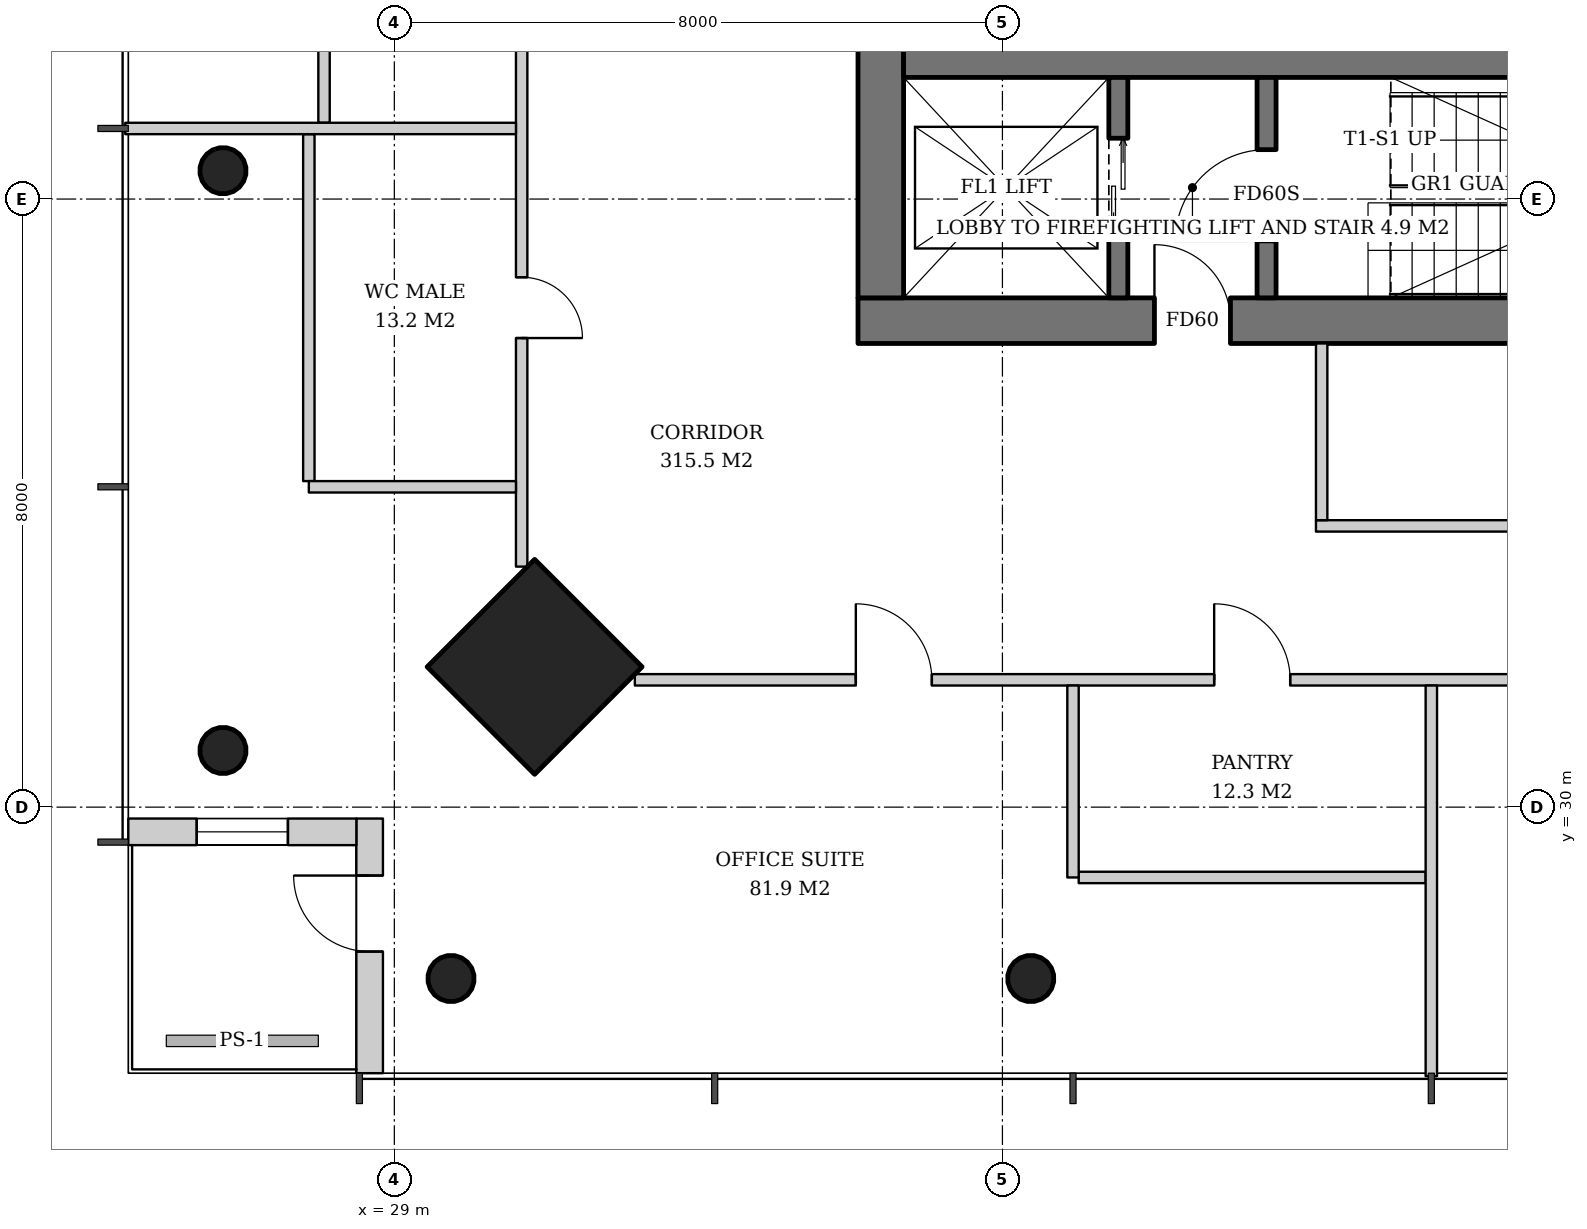
"""IFC4 building model, lengths in metres.
Left out: names, types, materials, properties, quantities, classifications, styles, units other than length and angle.
Written with IfcOpenShell. Run it as: python <this file> out.ifc"""

import sys

from ifc_helpers import new_model, si_unit, direction, frame, frame_2d, origin, origin_2d, place, context, subcontext, project, spatial, rectangle, hollow_circle, extrude, element, fill, save


model = new_model("IFC4")
c1 = context("Model", 3, precision=1e-05, world=origin(), true_north=direction((0.0, 1.0)))
c2 = subcontext(c1, "Body", "Model", "MODEL_VIEW")
j1 = project(units=[si_unit("LENGTHUNIT", "METRE"), si_unit("PLANEANGLEUNIT", "RADIAN")], contexts=[c1])
p1 = place(None, origin())
s1 = spatial("IfcSite", under=j1, at=p1, CompositionType="ELEMENT")
p2 = place(p1, origin())
s2 = spatial("IfcBuilding", under=s1, at=p2, CompositionType="ELEMENT")
p3 = place(p2, frame((0.0, 0.0, 199.6)))
s3 = spatial("IfcBuildingStorey", under=s2, at=p3, CompositionType="ELEMENT", Elevation=199.6)
p4 = place(p3, frame((30.807, 31.807, 0.0), z_axis=(0.031900153262, 0.031900153262, 0.998981861919), x_axis=(-0.707106781187, 0.707106781187, 0.0)))
e1 = element("IfcColumn", 1, at=p4, inside=s3, PredefinedType="COLUMN", context=c2, shape_type="SweptSolid", body=[
    extrude(rectangle(XDim=2.0, YDim=2.0, at=origin_2d()), origin(), (0.0, 0.0, 1.0), 3.804),
])
p5 = place(p3, frame((26.707, 30.707, 0.0), z_axis=(0.031964207655, 0.031964207655, 0.998977766949), x_axis=(-0.707106781187, 0.707106781187, 0.0)))
e2 = element("IfcColumn", 2, at=p5, inside=s3, PredefinedType="COLUMN", context=c2, shape_type="SweptSolid", body=[
    extrude(hollow_circle(Radius=0.305, WallThickness=0.025, at=origin_2d()), origin(), (0.0, 0.0, 1.0), 3.804),
])
p6 = place(p3, frame((26.707, 38.354, 0.0), z_axis=(0.031976461511, 0.015988230756, 0.999360736865), x_axis=(-0.4472135955, 0.894427191, 0.0)))
e3 = element("IfcColumn", 3, at=p6, inside=s3, PredefinedType="COLUMN", context=c2, shape_type="SweptSolid", body=[
    extrude(hollow_circle(Radius=0.305, WallThickness=0.025, at=origin_2d()), origin(), (0.0, 0.0, 1.0), 3.802),
])
p7 = place(p3, frame((29.707, 27.707, 0.0), z_axis=(0.031964207655, 0.031964207655, 0.998977766949), x_axis=(-0.707106781187, 0.707106781187, 0.0)))
e4 = element("IfcColumn", 4, at=p7, inside=s3, PredefinedType="COLUMN", context=c2, shape_type="SweptSolid", body=[
    extrude(hollow_circle(Radius=0.305, WallThickness=0.025, at=origin_2d()), origin(), (0.0, 0.0, 1.0), 3.804),
])
p8 = place(p3, frame((37.354, 27.707, 0.0), z_axis=(0.015988230756, 0.031976461511, 0.999360736865), x_axis=(-0.894427191, 0.4472135955, 0.0)))
e5 = element("IfcColumn", 5, at=p8, inside=s3, PredefinedType="COLUMN", context=c2, shape_type="SweptSolid", body=[
    extrude(hollow_circle(Radius=0.305, WallThickness=0.025, at=origin_2d()), origin(), (0.0, 0.0, 1.0), 3.802),
])
p9 = place(p3, frame((35.1, 36.4, 0.0), z_axis=(0.0, 0.0, 1.0), x_axis=(1.0, 0.0, 0.0)))
e6 = element("IfcWall", 6, at=p9, inside=s3, PredefinedType="SHEAR", context=c2, shape_type="SweptSolid", body=[
    extrude(rectangle(XDim=19.8, YDim=0.6, at=frame_2d((9.9, 0.0))), origin(), (0.0, 0.0, 1.0), 3.8),
])
p10 = place(p9, frame((3.9, 0.0, 0.0)))
e7 = element("IfcOpeningElement", 7, at=p10, cuts=e6, PredefinedType="OPENING", context=c2, shape_type="SweptSolid", body=[
    extrude(rectangle(XDim=1.0, YDim=2.1, at=frame_2d((0.5, 1.05))), frame((0.0, 0.31, 0.0), z_axis=(0.0, -1.0, 0.0), x_axis=(1.0, 0.0, 0.0)), (0.0, 0.0, 1.0), 0.62),
])
p11 = place(p9, frame((15.35, 0.0, 0.0)))
e8 = element("IfcOpeningElement", 8, at=p11, cuts=e6, PredefinedType="OPENING", context=c2, shape_type="SweptSolid", body=[
    extrude(rectangle(XDim=1.0, YDim=2.1, at=frame_2d((0.5, 1.05))), frame((0.0, 0.31, 0.0), z_axis=(0.0, -1.0, 0.0), x_axis=(1.0, 0.0, 0.0)), (0.0, 0.0, 1.0), 0.62),
])
p12 = place(p3, frame((35.4, 36.7, 0.0), z_axis=(0.0, 0.0, 1.0), x_axis=(0.0, 1.0, 0.0)))
e9 = element("IfcWall", 9, at=p12, inside=s3, PredefinedType="SHEAR", context=c2, shape_type="SweptSolid", body=[
    extrude(rectangle(XDim=18.6, YDim=0.6, at=frame_2d((9.3, 0.0))), origin(), (0.0, 0.0, 1.0), 3.8),
])
p13 = place(p12, frame((8.4, 0.0, 0.0)))
e10 = element("IfcOpeningElement", 10, at=p13, cuts=e9, PredefinedType="OPENING", context=c2, shape_type="SweptSolid", body=[
    extrude(rectangle(XDim=1.8, YDim=2.4, at=frame_2d((0.9, 1.2))), frame((0.0, 0.31, 0.0), z_axis=(0.0, -1.0, 0.0), x_axis=(1.0, 0.0, 0.0)), (0.0, 0.0, 1.0), 0.62),
])
p14 = place(p3, frame((35.7, 39.8, 0.0), z_axis=(0.0, 0.0, 1.0), x_axis=(1.0, 0.0, 0.0)))
e11 = element("IfcWall", 11, at=p14, inside=s3, PredefinedType="SHEAR", context=c2, shape_type="SweptSolid", body=[
    extrude(rectangle(XDim=18.6, YDim=0.4, at=frame_2d((9.3, 0.0))), origin(), (0.0, 0.0, 1.0), 3.8),
])
p15 = place(p3, frame((28.675, 26.5, 0.0), z_axis=(0.0, 0.0, 1.0), x_axis=(0.0, 1.0, 0.0)))
e12 = element("IfcWall", 12, at=p15, inside=s3, PredefinedType="SOLIDWALL", context=c2, shape_type="SweptSolid", body=[
    extrude(rectangle(XDim=3.35, YDim=0.35, at=frame_2d((1.675, 0.0))), origin(), (0.0, 0.0, 1.0), 3.62),
])
p16 = place(p15, frame((1.6, 0.0, 0.0)))
e13 = element("IfcOpeningElement", 13, at=p16, cuts=e12, PredefinedType="OPENING", context=c2, shape_type="SweptSolid", body=[
    extrude(rectangle(XDim=1.0, YDim=2.4, at=frame_2d((0.5, 1.2))), frame((0.0, 0.185, 0.0), z_axis=(0.0, -1.0, 0.0), x_axis=(1.0, 0.0, 0.0)), (0.0, 0.0, 1.0), 0.37),
])
p17 = place(p3, frame((28.5, 29.675, 0.0), z_axis=(0.0, 0.0, 1.0), x_axis=(-1.0, 0.0, 0.0)))
e14 = element("IfcWall", 14, at=p17, inside=s3, PredefinedType="SOLIDWALL", context=c2, shape_type="SweptSolid", body=[
    extrude(rectangle(XDim=3.0, YDim=0.35, at=frame_2d((1.5, 0.0))), origin(), (0.0, 0.0, 1.0), 3.62),
])
p18 = place(p17, frame((0.9, 0.0, 0.6)))
e15 = element("IfcOpeningElement", 15, at=p18, cuts=e14, PredefinedType="OPENING", context=c2, shape_type="SweptSolid", body=[
    extrude(rectangle(XDim=1.2, YDim=2.55, at=frame_2d((0.6, 1.275))), frame((0.0, 0.185, 0.0), z_axis=(0.0, -1.0, 0.0), x_axis=(1.0, 0.0, 0.0)), (0.0, 0.0, 1.0), 0.37),
])
p19 = place(p3, frame((38.525, 36.7, 0.0), z_axis=(0.0, 0.0, 1.0), x_axis=(0.0, 1.0, 0.0)))
e16 = element("IfcWall", 16, at=p19, inside=s3, PredefinedType="SHEAR", context=c2, shape_type="SweptSolid", body=[
    extrude(rectangle(XDim=2.9, YDim=0.25, at=frame_2d((1.45, 0.0))), origin(), (0.0, 0.0, 1.0), 3.8),
])
p20 = place(p19, frame((0.8, 0.0, 0.0)))
e17 = element("IfcOpeningElement", 17, at=p20, cuts=e16, PredefinedType="OPENING", context=c2, shape_type="SweptSolid", body=[
    extrude(rectangle(XDim=1.3, YDim=2.2, at=frame_2d((0.65, 1.1))), frame((0.0, 0.135, 0.0), z_axis=(0.0, -1.0, 0.0), x_axis=(1.0, 0.0, 0.0)), (0.0, 0.0, 1.0), 0.27),
])
p21 = place(p3, frame((40.475, 36.7, 0.0), z_axis=(0.0, 0.0, 1.0), x_axis=(0.0, 1.0, 0.0)))
e18 = element("IfcWall", 18, at=p21, inside=s3, PredefinedType="SHEAR", context=c2, shape_type="SweptSolid", body=[
    extrude(rectangle(XDim=2.9, YDim=0.25, at=frame_2d((1.45, 0.0))), origin(), (0.0, 0.0, 1.0), 3.8),
])
p22 = place(p21, frame((0.75, 0.0, 0.0)))
e19 = element("IfcOpeningElement", 19, at=p22, cuts=e18, PredefinedType="OPENING", context=c2, shape_type="SweptSolid", body=[
    extrude(rectangle(XDim=1.2, YDim=2.1, at=frame_2d((0.6, 1.05))), frame((0.0, 0.135, 0.0), z_axis=(0.0, -1.0, 0.0), x_axis=(1.0, 0.0, 0.0)), (0.0, 0.0, 1.0), 0.27),
])
p23 = place(p3, frame((41.125, 33.7, 0.0), z_axis=(0.0, 0.0, 1.0), x_axis=(1.0, 0.0, 0.0)))
e20 = element("IfcWall", 20, at=p23, inside=s3, PredefinedType="PARTITIONING", context=c2, shape_type="SweptSolid", body=[
    extrude(rectangle(XDim=8.2, YDim=0.15, at=frame_2d((4.1, 0.0))), origin(), (0.0, 0.0, 1.0), 2.867),
])
p24 = place(p23, frame((3.6, 0.0, 0.0)))
e21 = element("IfcOpeningElement", 21, at=p24, cuts=e20, PredefinedType="OPENING", context=c2, shape_type="SweptSolid", body=[
    extrude(rectangle(XDim=1.0, YDim=2.1, at=frame_2d((0.5, 1.05))), frame((0.0, 0.085, 0.0), z_axis=(0.0, -1.0, 0.0), x_axis=(1.0, 0.0, 0.0)), (0.0, 0.0, 1.0), 0.17),
])
p25 = place(p3, frame((41.2, 36.1, 0.0), z_axis=(0.0, 0.0, 1.0), x_axis=(0.0, -1.0, 0.0)))
e22 = element("IfcWall", 22, at=p25, inside=s3, PredefinedType="PARTITIONING", context=c2, shape_type="SweptSolid", body=[
    extrude(rectangle(XDim=2.325, YDim=0.15, at=frame_2d((1.163, 0.0))), origin(), (0.0, 0.0, 1.0), 3.62),
])
for number, where, z_axis, x_axis in (
    (23, (28.075, 43.568, 0.0), (0.0, 0.0, 1.0), (0.0, -1.0, 0.0)),
    (24, (27.875, 38.854, 0.0), (0.0, 0.0, 1.0), (0.0, -1.0, 0.0)),
):
    element("IfcWall", number, at=place(p3, frame(where, z_axis=z_axis, x_axis=x_axis)), inside=s3, PredefinedType="PARTITIONING", context=c2, shape_type="SweptSolid", body=[
        extrude(rectangle(XDim=4.564, YDim=0.15, at=frame_2d((2.282, 0.0))), origin(), (0.0, 0.0, 1.0), 2.867),
    ])
p26 = place(p3, frame((30.675, 58.836, 0.0), z_axis=(0.0, 0.0, 1.0), x_axis=(0.0, -1.0, 0.0)))
e25 = element("IfcWall", 25, at=p26, inside=s3, PredefinedType="PARTITIONING", context=c2, shape_type="SweptSolid", body=[
    extrude(rectangle(XDim=25.671, YDim=0.15, at=frame_2d((12.836, 0.0))), origin(), (0.0, 0.0, 1.0), 2.867),
])
p27 = place(p26, frame((2.907, 0.0, 0.0)))
e26 = element("IfcOpeningElement", 26, at=p27, cuts=e25, PredefinedType="OPENING", context=c2, shape_type="SweptSolid", body=[
    extrude(rectangle(XDim=1.0, YDim=2.1, at=frame_2d((0.5, 1.05))), frame((0.0, 0.085, 0.0), z_axis=(0.0, -1.0, 0.0), x_axis=(1.0, 0.0, 0.0)), (0.0, 0.0, 1.0), 0.17),
])
p28 = place(p26, frame((7.622, 0.0, 0.0)))
e27 = element("IfcOpeningElement", 27, at=p28, cuts=e25, PredefinedType="OPENING", context=c2, shape_type="SweptSolid", body=[
    extrude(rectangle(XDim=1.0, YDim=2.1, at=frame_2d((0.5, 1.05))), frame((0.0, 0.085, 0.0), z_axis=(0.0, -1.0, 0.0), x_axis=(1.0, 0.0, 0.0)), (0.0, 0.0, 1.0), 0.17),
])
p29 = place(p26, frame((12.436, 0.0, 0.0)))
e28 = element("IfcOpeningElement", 28, at=p29, cuts=e25, PredefinedType="OPENING", context=c2, shape_type="SweptSolid", body=[
    extrude(rectangle(XDim=0.8, YDim=2.1, at=frame_2d((0.4, 1.05))), frame((0.0, 0.085, 0.0), z_axis=(0.0, -1.0, 0.0), x_axis=(1.0, 0.0, 0.0)), (0.0, 0.0, 1.0), 0.17),
])
p30 = place(p26, frame((17.05, 0.0, 0.0)))
e29 = element("IfcOpeningElement", 29, at=p30, cuts=e25, PredefinedType="OPENING", context=c2, shape_type="SweptSolid", body=[
    extrude(rectangle(XDim=1.0, YDim=2.1, at=frame_2d((0.5, 1.05))), frame((0.0, 0.085, 0.0), z_axis=(0.0, -1.0, 0.0), x_axis=(1.0, 0.0, 0.0)), (0.0, 0.0, 1.0), 0.17),
])
p31 = place(p26, frame((21.864, 0.0, 0.0)))
e30 = element("IfcOpeningElement", 30, at=p31, cuts=e25, PredefinedType="OPENING", context=c2, shape_type="SweptSolid", body=[
    extrude(rectangle(XDim=0.8, YDim=2.1, at=frame_2d((0.4, 1.05))), frame((0.0, 0.085, 0.0), z_axis=(0.0, -1.0, 0.0), x_axis=(1.0, 0.0, 0.0)), (0.0, 0.0, 1.0), 0.17),
])
p32 = place(p3, frame((30.6, 38.928, 0.0), z_axis=(0.0, 0.0, 1.0), x_axis=(-1.0, 0.0, 0.0)))
e31 = element("IfcWall", 31, at=p32, inside=s3, PredefinedType="PARTITIONING", context=c2, shape_type="SweptSolid", body=[
    extrude(rectangle(XDim=5.14, YDim=0.15, at=frame_2d((2.57, 0.0))), origin(), (0.0, 0.0, 1.0), 3.12),
])
p33 = place(p3, frame((30.6, 34.214, 0.0), z_axis=(0.0, 0.0, 1.0), x_axis=(-1.0, 0.0, 0.0)))
e32 = element("IfcWall", 32, at=p33, inside=s3, PredefinedType="PARTITIONING", context=c2, shape_type="SweptSolid", body=[
    extrude(rectangle(XDim=2.725, YDim=0.15, at=frame_2d((1.363, 0.0))), origin(), (0.0, 0.0, 1.0), 3.62),
])
p34 = place(p3, frame((38.004, 29.075, 0.0), z_axis=(0.0, 0.0, 1.0), x_axis=(1.0, 0.0, 0.0)))
e33 = element("IfcWall", 33, at=p34, inside=s3, PredefinedType="PARTITIONING", context=c2, shape_type="SweptSolid", body=[
    extrude(rectangle(XDim=4.564, YDim=0.15, at=frame_2d((2.282, 0.0))), origin(), (0.0, 0.0, 1.0), 2.867),
])
p35 = place(p3, frame((32.164, 31.675, 0.0), z_axis=(0.0, 0.0, 1.0), x_axis=(1.0, 0.0, 0.0)))
e34 = element("IfcWall", 34, at=p35, inside=s3, PredefinedType="PARTITIONING", context=c2, shape_type="SweptSolid", body=[
    extrude(rectangle(XDim=25.671, YDim=0.15, at=frame_2d((12.836, 0.0))), origin(), (0.0, 0.0, 1.0), 2.867),
])
p36 = place(p35, frame((2.907, 0.0, 0.0)))
e35 = element("IfcOpeningElement", 35, at=p36, cuts=e34, PredefinedType="OPENING", context=c2, shape_type="SweptSolid", body=[
    extrude(rectangle(XDim=1.0, YDim=2.1, at=frame_2d((0.5, 1.05))), frame((0.0, 0.085, 0.0), z_axis=(0.0, -1.0, 0.0), x_axis=(1.0, 0.0, 0.0)), (0.0, 0.0, 1.0), 0.17),
])
p37 = place(p35, frame((7.622, 0.0, 0.0)))
e36 = element("IfcOpeningElement", 36, at=p37, cuts=e34, PredefinedType="OPENING", context=c2, shape_type="SweptSolid", body=[
    extrude(rectangle(XDim=1.0, YDim=2.1, at=frame_2d((0.5, 1.05))), frame((0.0, 0.085, 0.0), z_axis=(0.0, -1.0, 0.0), x_axis=(1.0, 0.0, 0.0)), (0.0, 0.0, 1.0), 0.17),
])
p38 = place(p35, frame((12.336, 0.0, 0.0)))
e37 = element("IfcOpeningElement", 37, at=p38, cuts=e34, PredefinedType="OPENING", context=c2, shape_type="SweptSolid", body=[
    extrude(rectangle(XDim=1.0, YDim=2.1, at=frame_2d((0.5, 1.05))), frame((0.0, 0.085, 0.0), z_axis=(0.0, -1.0, 0.0), x_axis=(1.0, 0.0, 0.0)), (0.0, 0.0, 1.0), 0.17),
])
p39 = place(p35, frame((17.05, 0.0, 0.0)))
e38 = element("IfcOpeningElement", 38, at=p39, cuts=e34, PredefinedType="OPENING", context=c2, shape_type="SweptSolid", body=[
    extrude(rectangle(XDim=1.0, YDim=2.1, at=frame_2d((0.5, 1.05))), frame((0.0, 0.085, 0.0), z_axis=(0.0, -1.0, 0.0), x_axis=(1.0, 0.0, 0.0)), (0.0, 0.0, 1.0), 0.17),
])
p40 = place(p35, frame((21.764, 0.0, 0.0)))
e39 = element("IfcOpeningElement", 39, at=p40, cuts=e34, PredefinedType="OPENING", context=c2, shape_type="SweptSolid", body=[
    extrude(rectangle(XDim=1.0, YDim=2.1, at=frame_2d((0.5, 1.05))), frame((0.0, 0.085, 0.0), z_axis=(0.0, -1.0, 0.0), x_axis=(1.0, 0.0, 0.0)), (0.0, 0.0, 1.0), 0.17),
])
p41 = place(p3, frame((37.928, 31.6, 0.0), z_axis=(0.0, 0.0, 1.0), x_axis=(0.0, -1.0, 0.0)))
e40 = element("IfcWall", 40, at=p41, inside=s3, PredefinedType="PARTITIONING", context=c2, shape_type="SweptSolid", body=[
    extrude(rectangle(XDim=2.525, YDim=0.15, at=frame_2d((1.263, 0.0))), origin(), (0.0, 0.0, 1.0), 3.62),
])
p42 = place(p3, frame((42.643, 31.6, 0.0), z_axis=(0.0, 0.0, 1.0), x_axis=(0.0, -1.0, 0.0)))
e41 = element("IfcWall", 41, at=p42, inside=s3, PredefinedType="PARTITIONING", context=c2, shape_type="SweptSolid", body=[
    extrude(rectangle(XDim=5.14, YDim=0.15, at=frame_2d((2.57, 0.0))), origin(), (0.0, 0.0, 1.0), 3.12),
])
p43 = place(p16, origin())
e42 = element("IfcDoor", 42, at=p43, inside=s3, OperationType="SINGLE_SWING_RIGHT", PredefinedType="DOOR", context=c2, shape_type="SweptSolid", body=[
    extrude(rectangle(XDim=1.0, YDim=2.4, at=frame_2d((0.5, 1.2))), frame((0.0, 0.025, 0.0), z_axis=(0.0, -1.0, 0.0), x_axis=(1.0, 0.0, 0.0)), (0.0, 0.0, 1.0), 0.05),
])
fill(e13, e42)
p44 = place(p18, origin())
e43 = element("IfcWindow", 43, at=p44, inside=s3, PartitioningType="SINGLE_PANEL", PredefinedType="WINDOW", context=c2, shape_type="SweptSolid", body=[
    extrude(rectangle(XDim=1.2, YDim=2.55, at=frame_2d((0.6, 1.275))), frame((0.0, 0.03, 0.0), z_axis=(0.0, -1.0, 0.0), x_axis=(1.0, 0.0, 0.0)), (0.0, 0.0, 1.0), 0.06),
])
fill(e15, e43)
p45 = place(p20, origin())
e44 = element("IfcDoor", 44, at=p45, inside=s3, OperationType="DOUBLE_DOOR_SLIDING", PredefinedType="DOOR", context=c2, shape_type="SweptSolid", body=[
    extrude(rectangle(XDim=1.3, YDim=2.2, at=frame_2d((0.65, 1.1))), frame((0.0, 0.025, 0.0), z_axis=(0.0, -1.0, 0.0), x_axis=(1.0, 0.0, 0.0)), (0.0, 0.0, 1.0), 0.05),
])
fill(e17, e44)
p46 = place(p22, origin())
e45 = element("IfcDoor", 45, at=p46, inside=s3, OperationType="SINGLE_SWING_LEFT", PredefinedType="DOOR", context=c2, shape_type="SweptSolid", body=[
    extrude(rectangle(XDim=1.2, YDim=2.1, at=frame_2d((0.6, 1.05))), frame((0.0, 0.025, 0.0), z_axis=(0.0, -1.0, 0.0), x_axis=(1.0, 0.0, 0.0)), (0.0, 0.0, 1.0), 0.05),
])
fill(e19, e45)
p47 = place(p10, origin())
e46 = element("IfcDoor", 46, at=p47, inside=s3, OperationType="SINGLE_SWING_LEFT", PredefinedType="DOOR", context=c2, shape_type="SweptSolid", body=[
    extrude(rectangle(XDim=1.0, YDim=2.1, at=frame_2d((0.5, 1.05))), frame((0.0, 0.025, 0.0), z_axis=(0.0, -1.0, 0.0), x_axis=(1.0, 0.0, 0.0)), (0.0, 0.0, 1.0), 0.05),
])
fill(e7, e46)
p48 = place(p31, origin())
e47 = element("IfcDoor", 47, at=p48, inside=s3, OperationType="SINGLE_SWING_RIGHT", PredefinedType="DOOR", context=c2, shape_type="SweptSolid", body=[
    extrude(rectangle(XDim=0.8, YDim=2.1, at=frame_2d((0.4, 1.05))), frame((0.0, 0.025, 0.0), z_axis=(0.0, -1.0, 0.0), x_axis=(1.0, 0.0, 0.0)), (0.0, 0.0, 1.0), 0.05),
])
fill(e30, e47)
p49 = place(p36, origin())
e48 = element("IfcDoor", 48, at=p49, inside=s3, OperationType="SINGLE_SWING_LEFT", PredefinedType="DOOR", context=c2, shape_type="SweptSolid", body=[
    extrude(rectangle(XDim=1.0, YDim=2.1, at=frame_2d((0.5, 1.05))), frame((0.0, 0.025, 0.0), z_axis=(0.0, -1.0, 0.0), x_axis=(1.0, 0.0, 0.0)), (0.0, 0.0, 1.0), 0.05),
])
fill(e35, e48)
p50 = place(p37, origin())
e49 = element("IfcDoor", 49, at=p50, inside=s3, OperationType="SINGLE_SWING_LEFT", PredefinedType="DOOR", context=c2, shape_type="SweptSolid", body=[
    extrude(rectangle(XDim=1.0, YDim=2.1, at=frame_2d((0.5, 1.05))), frame((0.0, 0.025, 0.0), z_axis=(0.0, -1.0, 0.0), x_axis=(1.0, 0.0, 0.0)), (0.0, 0.0, 1.0), 0.05),
])
fill(e36, e49)
save(model, sys.argv[1])
